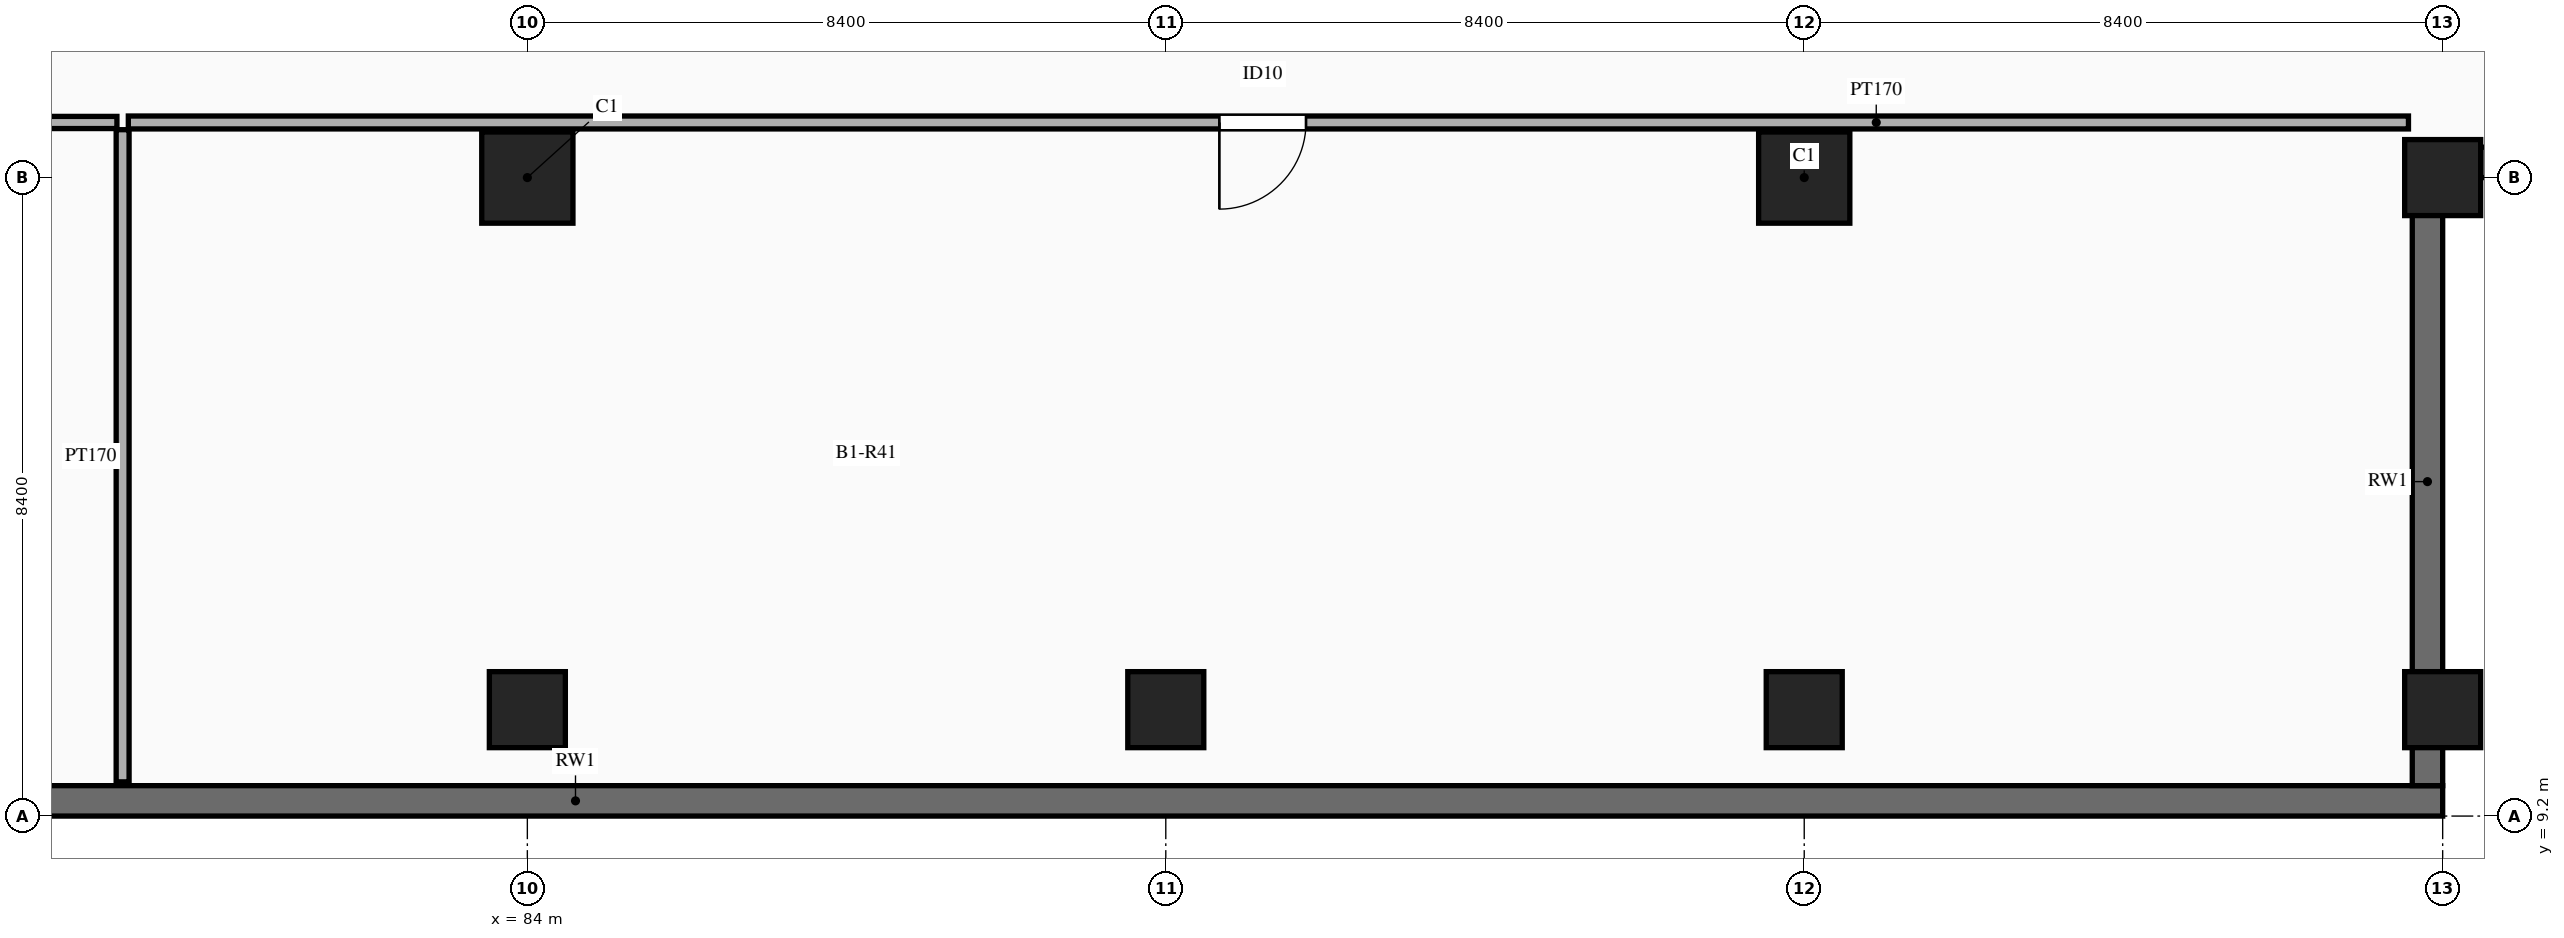
"""IFC4 building model, lengths in metres.
Left out: names, types, materials, properties, quantities, classifications, styles, units other than length and angle.
Written with IfcOpenShell. Run it as: python <this file> out.ifc"""

import sys

from ifc_helpers import new_model, si_unit, direction, frame, frame_2d, origin, origin_2d, place, context, subcontext, project, spatial, rectangle, extrude, element, fill, save


model = new_model("IFC4")
c1 = context("Model", 3, precision=1e-05, world=origin(), true_north=direction((0.0, 1.0)))
c2 = subcontext(c1, "Body", "Model", "MODEL_VIEW")
j1 = project(units=[si_unit("LENGTHUNIT", "METRE"), si_unit("PLANEANGLEUNIT", "RADIAN")], contexts=[c1])
p1 = place(None, origin())
s1 = spatial("IfcSite", under=j1, at=p1, CompositionType="ELEMENT")
p2 = place(p1, origin())
s2 = spatial("IfcBuilding", under=s1, at=p2, CompositionType="ELEMENT")
p3 = place(p2, frame((0.0, 0.0, -4.5)))
s3 = spatial("IfcBuildingStorey", under=s2, at=p3, CompositionType="ELEMENT", Elevation=-4.5)
p4 = place(p3, frame((84.0, 10.6, 0.0), z_axis=(0.0, 0.0, 1.0), x_axis=(1.0, 0.0, 0.0)))
e1 = element("IfcColumn", 1, at=p4, inside=s3, PredefinedType="COLUMN", context=c2, shape_type="SweptSolid", body=[
    extrude(rectangle(XDim=1.0, YDim=1.0, at=origin_2d()), origin(), (0.0, 0.0, 1.0), 4.5),
])
p5 = place(p3, frame((84.0, 17.6, 0.0), z_axis=(0.0, 0.0, 1.0), x_axis=(1.0, 0.0, 0.0)))
e2 = element("IfcColumn", 2, at=p5, inside=s3, PredefinedType="COLUMN", context=c2, shape_type="SweptSolid", body=[
    extrude(rectangle(XDim=1.2, YDim=1.2, at=origin_2d()), origin(), (0.0, 0.0, 1.0), 4.5),
])
for number, where, z_axis, x_axis in (
    (3, (92.4, 10.6, 0.0), (0.0, 0.0, 1.0), (1.0, 0.0, 0.0)),
    (4, (100.8, 10.6, 0.0), (0.0, 0.0, 1.0), (1.0, 0.0, 0.0)),
):
    element("IfcColumn", number, at=place(p3, frame(where, z_axis=z_axis, x_axis=x_axis)), inside=s3, PredefinedType="COLUMN", context=c2, shape_type="SweptSolid", body=[
        extrude(rectangle(XDim=1.0, YDim=1.0, at=origin_2d()), origin(), (0.0, 0.0, 1.0), 4.5),
    ])
p6 = place(p3, frame((100.8, 17.6, 0.0), z_axis=(0.0, 0.0, 1.0), x_axis=(1.0, 0.0, 0.0)))
e5 = element("IfcColumn", 5, at=p6, inside=s3, PredefinedType="COLUMN", context=c2, shape_type="SweptSolid", body=[
    extrude(rectangle(XDim=1.2, YDim=1.2, at=origin_2d()), origin(), (0.0, 0.0, 1.0), 4.5),
])
for number, where, z_axis, x_axis in (
    (6, (109.2, 10.6, 0.0), (0.0, 0.0, 1.0), (1.0, 0.0, 0.0)),
    (7, (109.2, 17.6, 0.0), (0.0, 0.0, 1.0), (1.0, 0.0, 0.0)),
):
    element("IfcColumn", number, at=place(p3, frame(where, z_axis=z_axis, x_axis=x_axis)), inside=s3, PredefinedType="COLUMN", context=c2, shape_type="SweptSolid", body=[
        extrude(rectangle(XDim=1.0, YDim=1.0, at=origin_2d()), origin(), (0.0, 0.0, 1.0), 4.5),
    ])
p7 = place(p3, frame((50.4, 9.4, 0.0), z_axis=(0.0, 0.0, 1.0), x_axis=(1.0, 0.0, 0.0)))
e8 = element("IfcWall", 8, at=p7, inside=s3, PredefinedType="USERDEFINED", context=c2, shape_type="SweptSolid", body=[
    extrude(rectangle(XDim=58.8, YDim=0.4, at=frame_2d((29.4, 0.0))), origin(), (0.0, 0.0, 1.0), 4.5),
])
p8 = place(p3, frame((109.0, 9.6, 0.0), z_axis=(0.0, 0.0, 1.0), x_axis=(0.0, 1.0, 0.0)))
e9 = element("IfcWall", 9, at=p8, inside=s3, PredefinedType="USERDEFINED", context=c2, shape_type="SweptSolid", body=[
    extrude(rectangle(XDim=8.0, YDim=0.4, at=frame_2d((4.0, 0.0))), origin(), (0.0, 0.0, 1.0), 4.5),
])
p9 = place(p3, frame((108.8, 17.8, 0.0), z_axis=(0.0, 0.0, 1.0), x_axis=(1.0, 0.0, 0.0)))
e10 = element("IfcWall", 10, at=p9, inside=s3, PredefinedType="USERDEFINED", context=c2, shape_type="SweptSolid", body=[
    extrude(rectangle(XDim=62.8, YDim=0.4, at=frame_2d((31.4, 0.0))), origin(), (0.0, 0.0, 1.0), 4.5),
])
p10 = place(p3, frame((50.85, 18.325, 0.0), z_axis=(0.0, 0.0, 1.0), x_axis=(1.0, 0.0, 0.0)))
e11 = element("IfcWall", 11, at=p10, inside=s3, PredefinedType="PARTITIONING", context=c2, shape_type="SweptSolid", body=[
    extrude(rectangle(XDim=27.75, YDim=0.16, at=frame_2d((13.875, 0.0))), origin(), (0.0, 0.0, 1.0), 3.45),
])
p11 = place(p10, frame((13.305, 0.0, 0.0)))
e12 = element("IfcOpeningElement", 12, at=p11, cuts=e11, PredefinedType="OPENING", context=c2, shape_type="SweptSolid", body=[
    extrude(rectangle(XDim=1.14, YDim=2.22, at=frame_2d((0.57, 1.11))), frame((0.0, 0.09, 0.0), z_axis=(0.0, -1.0, 0.0), x_axis=(1.0, 0.0, 0.0)), (0.0, 0.0, 1.0), 0.18),
])
p12 = place(p3, frame((78.75, 18.325, 0.0), z_axis=(0.0, 0.0, 1.0), x_axis=(1.0, 0.0, 0.0)))
e13 = element("IfcWall", 13, at=p12, inside=s3, PredefinedType="PARTITIONING", context=c2, shape_type="SweptSolid", body=[
    extrude(rectangle(XDim=30.0, YDim=0.17, at=frame_2d((15.0, 0.0))), origin(), (0.0, 0.0, 1.0), 3.45),
])
p13 = place(p12, frame((14.355, 0.0, 0.0)))
e14 = element("IfcOpeningElement", 14, at=p13, cuts=e13, PredefinedType="OPENING", context=c2, shape_type="SweptSolid", body=[
    extrude(rectangle(XDim=1.14, YDim=2.22, at=frame_2d((0.57, 1.11))), frame((0.0, 0.095, 0.0), z_axis=(0.0, -1.0, 0.0), x_axis=(1.0, 0.0, 0.0)), (0.0, 0.0, 1.0), 0.19),
])
p14 = place(p3, frame((78.675, 9.65, 0.0), z_axis=(0.0, 0.0, 1.0), x_axis=(0.0, 1.0, 0.0)))
e15 = element("IfcWall", 15, at=p14, inside=s3, PredefinedType="PARTITIONING", context=c2, shape_type="SweptSolid", body=[
    extrude(rectangle(XDim=8.58, YDim=0.17, at=frame_2d((4.29, 0.0))), origin(), (0.0, 0.0, 1.0), 3.45),
])
p15 = place(p13, frame((1.14, 0.0, 0.0), z_axis=(0.0, 0.0, 1.0), x_axis=(-1.0, 0.0, 0.0)))
e16 = element("IfcDoor", 16, at=p15, inside=s3, OperationType="SINGLE_SWING_RIGHT", PredefinedType="DOOR", context=c2, shape_type="SweptSolid", body=[
    extrude(rectangle(XDim=1.14, YDim=2.22, at=frame_2d((0.57, 1.11))), frame((0.0, 0.025, 0.0), z_axis=(0.0, -1.0, 0.0), x_axis=(1.0, 0.0, 0.0)), (0.0, 0.0, 1.0), 0.05),
])
fill(e14, e16)
save(model, sys.argv[1])
